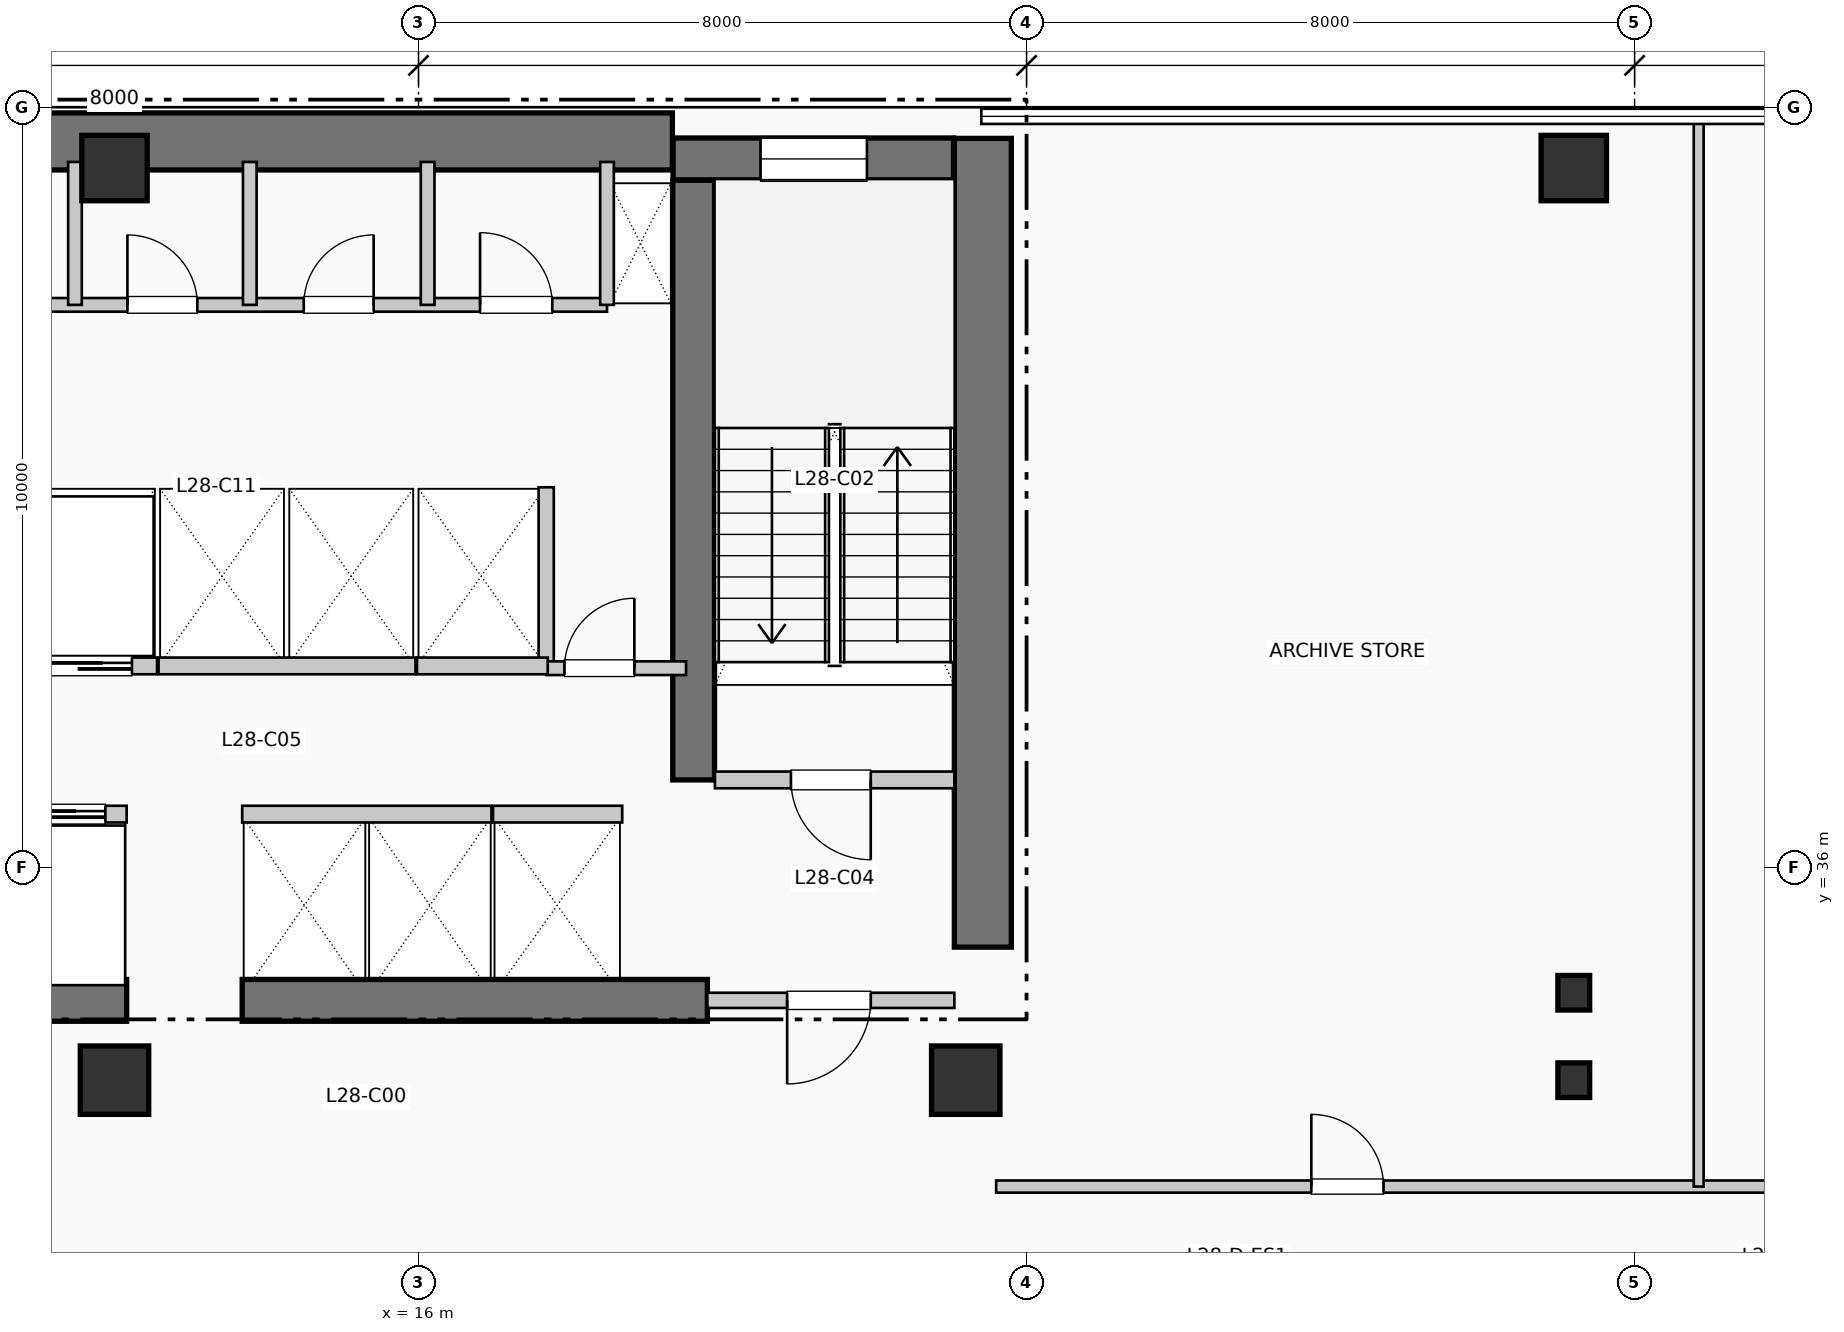
"""IFC4 building model, lengths in metres.
Left out: names, types, materials, properties, quantities, classifications, styles, units other than length and angle.
Written with IfcOpenShell. Run it as: python <this file> out.ifc"""

import sys

from ifc_helpers import new_model, si_unit, direction, frame, frame_2d, origin, origin_2d, place, context, subcontext, project, spatial, rectangle, i_section, extrude, element, fill, save


model = new_model("IFC4")
c1 = context("Model", 3, precision=1e-05, world=origin(), true_north=direction((0.0, 1.0)))
c2 = subcontext(c1, "Body", "Model", "MODEL_VIEW")
j1 = project(units=[si_unit("LENGTHUNIT", "METRE"), si_unit("PLANEANGLEUNIT", "RADIAN")], contexts=[c1])
p1 = place(None, origin())
s1 = spatial("IfcSite", under=j1, at=p1, CompositionType="ELEMENT")
p2 = place(p1, origin())
s2 = spatial("IfcBuilding", under=s1, at=p2, CompositionType="ELEMENT")
p3 = place(p2, frame((0.0, 0.0, 118.47)))
s3 = spatial("IfcBuildingStorey", under=s2, at=p3, CompositionType="ELEMENT", Elevation=118.47)
p4 = place(p3, frame((5.36, 45.55, 0.0), z_axis=(0.0, 0.0, 1.0), x_axis=(1.0, 0.0, 0.0)))
e1 = element("IfcWall", 1, at=p4, inside=s3, PredefinedType="SHEAR", context=c2, shape_type="SweptSolid", body=[
    extrude(rectangle(XDim=13.98, YDim=0.75, at=frame_2d((6.99, 0.0))), origin(), (0.0, 0.0, 1.0), 3.96),
])
p5 = place(p3, frame((23.425, 34.95, 0.0), z_axis=(0.0, 0.0, 1.0), x_axis=(0.0, 1.0, 0.0)))
e2 = element("IfcWall", 2, at=p5, inside=s3, PredefinedType="SHEAR", context=c2, shape_type="SweptSolid", body=[
    extrude(rectangle(XDim=10.64, YDim=0.75, at=frame_2d((5.32, 0.0))), origin(), (0.0, 0.0, 1.0), 3.96),
])
p6 = place(p3, frame((1.45, 34.25, 0.0), z_axis=(0.0, 0.0, 1.0), x_axis=(1.0, 0.0, 0.0)))
e3 = element("IfcWall", 3, at=p6, inside=s3, PredefinedType="SHEAR", context=c2, shape_type="SweptSolid", body=[
    extrude(rectangle(XDim=10.71, YDim=0.55, at=frame_2d((5.355, 0.0))), origin(), (0.0, 0.0, 1.0), 3.96),
])
p7 = place(p6, frame((7.25, 0.0, 0.0), z_axis=(0.0, 0.0, 1.0), x_axis=(-1.0, 0.0, 0.0)))
e4 = element("IfcOpeningElement", 4, at=p7, cuts=e3, PredefinedType="OPENING", context=c2, shape_type="SweptSolid", body=[
    extrude(rectangle(XDim=1.1, YDim=2.15, at=frame_2d((0.55, 1.075))), frame((0.0, 0.285, 0.0), z_axis=(0.0, -1.0, 0.0), x_axis=(1.0, 0.0, 0.0)), (0.0, 0.0, 1.0), 0.57),
])
p8 = place(p3, frame((13.68, 34.25, 0.0), z_axis=(0.0, 0.0, 1.0), x_axis=(1.0, 0.0, 0.0)))
e5 = element("IfcWall", 5, at=p8, inside=s3, PredefinedType="SHEAR", context=c2, shape_type="SweptSolid", body=[
    extrude(rectangle(XDim=6.12, YDim=0.55, at=frame_2d((3.06, 0.0))), origin(), (0.0, 0.0, 1.0), 3.96),
])
p9 = place(p3, frame((19.62, 37.15, 0.0), z_axis=(0.0, 0.0, 1.0), x_axis=(0.0, 1.0, 0.0)))
e6 = element("IfcWall", 6, at=p9, inside=s3, PredefinedType="SHEAR", context=c2, shape_type="SweptSolid", body=[
    extrude(rectangle(XDim=7.89, YDim=0.55, at=frame_2d((3.945, 0.0))), origin(), (0.0, 0.0, 1.0), 3.96),
])
p10 = place(p3, frame((19.35, 45.32, 0.0), z_axis=(0.0, 0.0, 1.0), x_axis=(1.0, 0.0, 0.0)))
e7 = element("IfcWall", 7, at=p10, inside=s3, PredefinedType="SHEAR", context=c2, shape_type="SweptSolid", body=[
    extrude(rectangle(XDim=3.69, YDim=0.55, at=frame_2d((1.845, 0.0))), origin(), (0.0, 0.0, 1.0), 3.96),
])
p11 = place(p10, frame((1.15, 0.0, 1.05)))
e8 = element("IfcOpeningElement", 8, at=p11, cuts=e7, PredefinedType="OPENING", context=c2, shape_type="SweptSolid", body=[
    extrude(rectangle(XDim=1.4, YDim=1.8, at=frame_2d((0.7, 0.9))), frame((0.0, 0.285, 0.0), z_axis=(0.0, -1.0, 0.0), x_axis=(1.0, 0.0, 0.0)), (0.0, 0.0, 1.0), 0.57),
])
p12 = place(p3, frame((12.0, 33.2, 0.0), z_axis=(0.0, 0.0, 1.0), x_axis=(1.0, 0.0, 0.0)))
e9 = element("IfcColumn", 9, at=p12, inside=s3, PredefinedType="COLUMN", context=c2, shape_type="SweptSolid", body=[
    extrude(rectangle(XDim=0.9, YDim=0.9, at=origin_2d()), origin(), (0.0, 0.0, 1.0), 3.96),
])
p13 = place(p3, frame((12.0, 45.2, 0.0), z_axis=(0.0, 0.0, 1.0), x_axis=(1.0, 0.0, 0.0)))
e10 = element("IfcColumn", 10, at=p13, inside=s3, PredefinedType="COLUMN", context=c2, shape_type="SweptSolid", body=[
    extrude(rectangle(XDim=0.86, YDim=0.86, at=origin_2d()), origin(), (0.0, 0.0, 1.0), 3.96),
])
p14 = place(p3, frame((23.2, 33.2, 0.0), z_axis=(0.0, 0.0, 1.0), x_axis=(1.0, 0.0, 0.0)))
e11 = element("IfcColumn", 11, at=p14, inside=s3, PredefinedType="COLUMN", context=c2, shape_type="SweptSolid", body=[
    extrude(rectangle(XDim=0.9, YDim=0.9, at=origin_2d()), origin(), (0.0, 0.0, 1.0), 3.96),
])
for number, where, z_axis, x_axis in (
    (12, (31.2, 33.2, 0.0), (0.0, 0.0, 1.0), (1.0, 0.0, 0.0)),
    (13, (31.2, 34.35, 0.0), (0.0, 0.0, 1.0), (1.0, 0.0, 0.0)),
):
    element("IfcColumn", number, at=place(p3, frame(where, z_axis=z_axis, x_axis=x_axis)), inside=s3, PredefinedType="COLUMN", context=c2, shape_type="SweptSolid", body=[
        extrude(i_section(OverallWidth=0.418, OverallDepth=0.455, WebThickness=0.032, FlangeThickness=0.051, at=origin_2d()), origin(), (0.0, 0.0, 1.0), 3.96),
    ])
p15 = place(p3, frame((31.2, 45.2, 0.0), z_axis=(0.0, 0.0, 1.0), x_axis=(1.0, 0.0, 0.0)))
e14 = element("IfcColumn", 14, at=p15, inside=s3, PredefinedType="COLUMN", context=c2, shape_type="SweptSolid", body=[
    extrude(rectangle(XDim=0.86, YDim=0.86, at=origin_2d()), origin(), (0.0, 0.0, 1.0), 3.96),
])
p16 = place(p3, frame((19.9, 37.15, 0.0), z_axis=(0.0, 0.0, 1.0), x_axis=(1.0, 0.0, 0.0)))
e15 = element("IfcWall", 15, at=p16, inside=s3, PredefinedType="PARTITIONING", context=c2, shape_type="SweptSolid", body=[
    extrude(rectangle(XDim=3.15, YDim=0.22, at=frame_2d((1.575, 0.0))), origin(), (0.0, 0.0, 1.0), 3.71),
])
p17 = place(p16, frame((2.05, 0.0, 0.0), z_axis=(0.0, 0.0, 1.0), x_axis=(-1.0, 0.0, 0.0)))
e16 = element("IfcOpeningElement", 16, at=p17, cuts=e15, PredefinedType="OPENING", context=c2, shape_type="SweptSolid", body=[
    extrude(rectangle(XDim=1.05, YDim=2.15, at=frame_2d((0.525, 1.075))), frame((0.0, 0.12, 0.0), z_axis=(0.0, -1.0, 0.0), x_axis=(1.0, 0.0, 0.0)), (0.0, 0.0, 1.0), 0.24),
])
p18 = place(p3, frame((19.8, 34.25, 0.0), z_axis=(0.0, 0.0, 1.0), x_axis=(1.0, 0.0, 0.0)))
e17 = element("IfcWall", 17, at=p18, inside=s3, PredefinedType="PARTITIONING", context=c2, shape_type="SweptSolid", body=[
    extrude(rectangle(XDim=3.25, YDim=0.2, at=frame_2d((1.625, 0.0))), origin(), (0.0, 0.0, 1.0), 3.71),
])
p19 = place(p18, frame((2.15, 0.0, 0.0), z_axis=(0.0, 0.0, 1.0), x_axis=(-1.0, 0.0, 0.0)))
e18 = element("IfcOpeningElement", 18, at=p19, cuts=e17, PredefinedType="OPENING", context=c2, shape_type="SweptSolid", body=[
    extrude(rectangle(XDim=1.1, YDim=2.15, at=frame_2d((0.55, 1.075))), frame((0.0, 0.11, 0.0), z_axis=(0.0, -1.0, 0.0), x_axis=(1.0, 0.0, 0.0)), (0.0, 0.0, 1.0), 0.22),
])
p20 = place(p3, frame((17.68, 38.65, 0.0), z_axis=(0.0, 0.0, 1.0), x_axis=(0.0, 1.0, 0.0)))
e19 = element("IfcWall", 19, at=p20, inside=s3, PredefinedType="PARTITIONING", context=c2, shape_type="SweptSolid", body=[
    extrude(rectangle(XDim=2.35, YDim=0.2, at=frame_2d((1.175, 0.0))), origin(), (0.0, 0.0, 1.0), 3.71),
])
p21 = place(p3, frame((17.68, 38.62, 0.0), z_axis=(0.0, 0.0, 1.0), x_axis=(1.0, 0.0, 0.0)))
e20 = element("IfcWall", 20, at=p21, inside=s3, PredefinedType="PARTITIONING", context=c2, shape_type="SweptSolid", body=[
    extrude(rectangle(XDim=1.84, YDim=0.18, at=frame_2d((0.92, 0.0))), origin(), (0.0, 0.0, 1.0), 3.71),
])
p22 = place(p21, frame((0.24, 0.0, 0.0)))
e21 = element("IfcOpeningElement", 21, at=p22, cuts=e20, PredefinedType="OPENING", context=c2, shape_type="SweptSolid", body=[
    extrude(rectangle(XDim=0.92, YDim=2.1, at=frame_2d((0.46, 1.05))), frame((0.0, 0.1, 0.0), z_axis=(0.0, -1.0, 0.0), x_axis=(1.0, 0.0, 0.0)), (0.0, 0.0, 1.0), 0.2),
])
p23 = place(p3, frame((8.9, 36.7, 0.0), z_axis=(0.0, 0.0, 1.0), x_axis=(1.0, 0.0, 0.0)))
e22 = element("IfcWall", 22, at=p23, inside=s3, PredefinedType="PARTITIONING", context=c2, shape_type="SweptSolid", body=[
    extrude(rectangle(XDim=3.26, YDim=0.22, at=frame_2d((1.63, 0.0))), origin(), (0.0, 0.0, 1.0), 3.71),
])
p24 = place(p23, frame((0.26, 0.0, 0.0)))
e23 = element("IfcOpeningElement", 23, at=p24, cuts=e22, PredefinedType="OPENING", context=c2, shape_type="SweptSolid", body=[
    extrude(rectangle(XDim=1.1, YDim=2.2, at=frame_2d((0.55, 1.1))), frame((0.0, 0.12, 0.0), z_axis=(0.0, -1.0, 0.0), x_axis=(1.0, 0.0, 0.0)), (0.0, 0.0, 1.0), 0.24),
])
p25 = place(p23, frame((1.88, 0.0, 0.0)))
e24 = element("IfcOpeningElement", 24, at=p25, cuts=e22, PredefinedType="OPENING", context=c2, shape_type="SweptSolid", body=[
    extrude(rectangle(XDim=1.1, YDim=2.2, at=frame_2d((0.55, 1.1))), frame((0.0, 0.12, 0.0), z_axis=(0.0, -1.0, 0.0), x_axis=(1.0, 0.0, 0.0)), (0.0, 0.0, 1.0), 0.24),
])
p26 = place(p3, frame((9.18, 38.65, 0.0), z_axis=(0.0, 0.0, 1.0), x_axis=(1.0, 0.0, 0.0)))
e25 = element("IfcWall", 25, at=p26, inside=s3, PredefinedType="PARTITIONING", context=c2, shape_type="SweptSolid", body=[
    extrude(rectangle(XDim=3.38, YDim=0.22, at=frame_2d((1.69, 0.0))), origin(), (0.0, 0.0, 1.0), 3.71),
])
p27 = place(p26, frame((0.3, 0.0, 0.0)))
e26 = element("IfcOpeningElement", 26, at=p27, cuts=e25, PredefinedType="OPENING", context=c2, shape_type="SweptSolid", body=[
    extrude(rectangle(XDim=1.1, YDim=2.2, at=frame_2d((0.55, 1.1))), frame((0.0, 0.12, 0.0), z_axis=(0.0, -1.0, 0.0), x_axis=(1.0, 0.0, 0.0)), (0.0, 0.0, 1.0), 0.24),
])
p28 = place(p26, frame((1.95, 0.0, 0.0)))
e27 = element("IfcOpeningElement", 27, at=p28, cuts=e25, PredefinedType="OPENING", context=c2, shape_type="SweptSolid", body=[
    extrude(rectangle(XDim=1.1, YDim=2.2, at=frame_2d((0.55, 1.1))), frame((0.0, 0.12, 0.0), z_axis=(0.0, -1.0, 0.0), x_axis=(1.0, 0.0, 0.0)), (0.0, 0.0, 1.0), 0.24),
])
p29 = place(p3, frame((13.68, 36.7, 0.0), z_axis=(0.0, 0.0, 1.0), x_axis=(1.0, 0.0, 0.0)))
e28 = element("IfcWall", 28, at=p29, inside=s3, PredefinedType="PARTITIONING", context=c2, shape_type="SweptSolid", body=[
    extrude(rectangle(XDim=3.28, YDim=0.22, at=frame_2d((1.64, 0.0))), origin(), (0.0, 0.0, 1.0), 3.71),
])
p30 = place(p3, frame((12.58, 38.65, 0.0), z_axis=(0.0, 0.0, 1.0), x_axis=(1.0, 0.0, 0.0)))
e29 = element("IfcWall", 29, at=p30, inside=s3, PredefinedType="PARTITIONING", context=c2, shape_type="SweptSolid", body=[
    extrude(rectangle(XDim=3.38, YDim=0.22, at=frame_2d((1.69, 0.0))), origin(), (0.0, 0.0, 1.0), 3.71),
])
p31 = place(p3, frame((16.98, 36.7, 0.0), z_axis=(0.0, 0.0, 1.0), x_axis=(1.0, 0.0, 0.0)))
e30 = element("IfcWall", 30, at=p31, inside=s3, PredefinedType="PARTITIONING", context=c2, shape_type="SweptSolid", body=[
    extrude(rectangle(XDim=1.7, YDim=0.22, at=frame_2d((0.85, 0.0))), origin(), (0.0, 0.0, 1.0), 3.71),
])
p32 = place(p3, frame((15.98, 38.65, 0.0), z_axis=(0.0, 0.0, 1.0), x_axis=(1.0, 0.0, 0.0)))
e31 = element("IfcWall", 31, at=p32, inside=s3, PredefinedType="PARTITIONING", context=c2, shape_type="SweptSolid", body=[
    extrude(rectangle(XDim=1.72, YDim=0.22, at=frame_2d((0.86, 0.0))), origin(), (0.0, 0.0, 1.0), 3.71),
])
p33 = place(p3, frame((9.15, 43.4, 0.0), z_axis=(0.0, 0.0, 1.0), x_axis=(1.0, 0.0, 0.0)))
e32 = element("IfcWall", 32, at=p33, inside=s3, PredefinedType="PLUMBINGWALL", context=c2, shape_type="SweptSolid", body=[
    extrude(rectangle(XDim=9.33, YDim=0.18, at=frame_2d((4.665, 0.0))), origin(), (0.0, 0.0, 1.0), 3.71),
])
p34 = place(p33, frame((0.72, 0.0, 0.0)))
e33 = element("IfcOpeningElement", 33, at=p34, cuts=e32, PredefinedType="OPENING", context=c2, shape_type="SweptSolid", body=[
    extrude(rectangle(XDim=0.92, YDim=2.1, at=frame_2d((0.46, 1.05))), frame((0.0, 0.1, 0.0), z_axis=(0.0, -1.0, 0.0), x_axis=(1.0, 0.0, 0.0)), (0.0, 0.0, 1.0), 0.2),
])
p35 = place(p33, frame((3.02, 0.0, 0.0)))
e34 = element("IfcOpeningElement", 34, at=p35, cuts=e32, PredefinedType="OPENING", context=c2, shape_type="SweptSolid", body=[
    extrude(rectangle(XDim=0.92, YDim=2.1, at=frame_2d((0.46, 1.05))), frame((0.0, 0.1, 0.0), z_axis=(0.0, -1.0, 0.0), x_axis=(1.0, 0.0, 0.0)), (0.0, 0.0, 1.0), 0.2),
])
p36 = place(p33, frame((5.34, 0.0, 0.0)))
e35 = element("IfcOpeningElement", 35, at=p36, cuts=e32, PredefinedType="OPENING", context=c2, shape_type="SweptSolid", body=[
    extrude(rectangle(XDim=0.92, YDim=2.1, at=frame_2d((0.46, 1.05))), frame((0.0, 0.1, 0.0), z_axis=(0.0, -1.0, 0.0), x_axis=(1.0, 0.0, 0.0)), (0.0, 0.0, 1.0), 0.2),
])
p37 = place(p33, frame((7.66, 0.0, 0.0)))
e36 = element("IfcOpeningElement", 36, at=p37, cuts=e32, PredefinedType="OPENING", context=c2, shape_type="SweptSolid", body=[
    extrude(rectangle(XDim=0.95, YDim=2.1, at=frame_2d((0.475, 1.05))), frame((0.0, 0.1, 0.0), z_axis=(0.0, -1.0, 0.0), x_axis=(1.0, 0.0, 0.0)), (0.0, 0.0, 1.0), 0.2),
])
for number, where, z_axis, x_axis in (
    (37, (18.48, 43.4, 0.0), (0.0, 0.0, 1.0), (0.0, 1.0, 0.0)),
    (38, (11.48, 43.4, 0.0), (0.0, 0.0, 1.0), (0.0, 1.0, 0.0)),
    (39, (13.78, 43.4, 0.0), (0.0, 0.0, 1.0), (0.0, 1.0, 0.0)),
    (40, (16.12, 43.4, 0.0), (0.0, 0.0, 1.0), (0.0, 1.0, 0.0)),
):
    element("IfcWall", number, at=place(p3, frame(where, z_axis=z_axis, x_axis=x_axis)), inside=s3, PredefinedType="PLUMBINGWALL", context=c2, shape_type="SweptSolid", body=[
        extrude(rectangle(XDim=1.88, YDim=0.18, at=frame_2d((0.94, 0.0))), origin(), (0.0, 0.0, 1.0), 3.71),
    ])
p38 = place(p3, frame((23.6, 31.8, 0.0), z_axis=(0.0, 0.0, 1.0), x_axis=(1.0, 0.0, 0.0)))
e41 = element("IfcWall", 41, at=p38, inside=s3, PredefinedType="PARTITIONING", context=c2, shape_type="SweptSolid", body=[
    extrude(rectangle(XDim=26.41, YDim=0.16, at=frame_2d((13.205, 0.0))), origin(), (0.0, 0.0, 1.0), 3.71),
])
p39 = place(p38, frame((4.147, 0.0, 0.0)))
e42 = element("IfcOpeningElement", 42, at=p39, cuts=e41, PredefinedType="OPENING", context=c2, shape_type="SweptSolid", body=[
    extrude(rectangle(XDim=0.95, YDim=2.15, at=frame_2d((0.475, 1.075))), frame((0.0, 0.09, 0.0), z_axis=(0.0, -1.0, 0.0), x_axis=(1.0, 0.0, 0.0)), (0.0, 0.0, 1.0), 0.18),
])
p40 = place(p38, frame((13.39, 0.0, 0.0)))
e43 = element("IfcOpeningElement", 43, at=p40, cuts=e41, PredefinedType="OPENING", context=c2, shape_type="SweptSolid", body=[
    extrude(rectangle(XDim=0.95, YDim=2.15, at=frame_2d((0.475, 1.075))), frame((0.0, 0.09, 0.0), z_axis=(0.0, -1.0, 0.0), x_axis=(1.0, 0.0, 0.0)), (0.0, 0.0, 1.0), 0.18),
])
p41 = place(p38, frame((21.973, 0.0, 0.0)))
e44 = element("IfcOpeningElement", 44, at=p41, cuts=e41, PredefinedType="OPENING", context=c2, shape_type="SweptSolid", body=[
    extrude(rectangle(XDim=0.95, YDim=2.15, at=frame_2d((0.475, 1.075))), frame((0.0, 0.09, 0.0), z_axis=(0.0, -1.0, 0.0), x_axis=(1.0, 0.0, 0.0)), (0.0, 0.0, 1.0), 0.18),
])
p42 = place(p3, frame((32.844, 31.8, 0.0), z_axis=(0.0, 0.0, 1.0), x_axis=(0.0, 1.0, 0.0)))
e45 = element("IfcWall", 45, at=p42, inside=s3, PredefinedType="PARTITIONING", context=c2, shape_type="SweptSolid", body=[
    extrude(rectangle(XDim=14.01, YDim=0.13, at=frame_2d((7.005, 0.0))), origin(), (0.0, 0.0, 1.0), 3.71),
])
p43 = place(p11, origin())
e46 = element("IfcWindow", 46, at=p43, inside=s3, PartitioningType="SINGLE_PANEL", PredefinedType="WINDOW", context=c2, shape_type="SweptSolid", body=[
    extrude(rectangle(XDim=1.4, YDim=1.8, at=frame_2d((0.7, 0.9))), frame((0.0, 0.03, 0.0), z_axis=(0.0, -1.0, 0.0), x_axis=(1.0, 0.0, 0.0)), (0.0, 0.0, 1.0), 0.06),
])
fill(e8, e46)
p44 = place(p17, origin())
e47 = element("IfcDoor", 47, at=p44, inside=s3, OperationType="SINGLE_SWING_RIGHT", PredefinedType="DOOR", context=c2, shape_type="SweptSolid", body=[
    extrude(rectangle(XDim=1.05, YDim=2.15, at=frame_2d((0.525, 1.075))), frame((0.0, 0.025, 0.0), z_axis=(0.0, -1.0, 0.0), x_axis=(1.0, 0.0, 0.0)), (0.0, 0.0, 1.0), 0.05),
])
fill(e16, e47)
p45 = place(p19, origin())
e48 = element("IfcDoor", 48, at=p45, inside=s3, OperationType="SINGLE_SWING_LEFT", PredefinedType="DOOR", context=c2, shape_type="SweptSolid", body=[
    extrude(rectangle(XDim=1.1, YDim=2.15, at=frame_2d((0.55, 1.075))), frame((0.0, 0.025, 0.0), z_axis=(0.0, -1.0, 0.0), x_axis=(1.0, 0.0, 0.0)), (0.0, 0.0, 1.0), 0.05),
])
fill(e18, e48)
p46 = place(p22, origin())
e49 = element("IfcDoor", 49, at=p46, inside=s3, OperationType="SINGLE_SWING_RIGHT", PredefinedType="DOOR", context=c2, shape_type="SweptSolid", body=[
    extrude(rectangle(XDim=0.92, YDim=2.1, at=frame_2d((0.46, 1.05))), frame((0.0, 0.025, 0.0), z_axis=(0.0, -1.0, 0.0), x_axis=(1.0, 0.0, 0.0)), (0.0, 0.0, 1.0), 0.05),
])
fill(e21, e49)
p47 = place(p25, origin())
e50 = element("IfcDoor", 50, at=p47, inside=s3, OperationType="SLIDING_TO_LEFT", PredefinedType="DOOR", context=c2, shape_type="SweptSolid", body=[
    extrude(rectangle(XDim=1.1, YDim=2.2, at=frame_2d((0.55, 1.1))), frame((0.0, 0.025, 0.0), z_axis=(0.0, -1.0, 0.0), x_axis=(1.0, 0.0, 0.0)), (0.0, 0.0, 1.0), 0.05),
])
fill(e24, e50)
p48 = place(p28, origin())
e51 = element("IfcDoor", 51, at=p48, inside=s3, OperationType="SLIDING_TO_LEFT", PredefinedType="DOOR", context=c2, shape_type="SweptSolid", body=[
    extrude(rectangle(XDim=1.1, YDim=2.2, at=frame_2d((0.55, 1.1))), frame((0.0, 0.025, 0.0), z_axis=(0.0, -1.0, 0.0), x_axis=(1.0, 0.0, 0.0)), (0.0, 0.0, 1.0), 0.05),
])
fill(e27, e51)
p49 = place(p35, origin())
e52 = element("IfcDoor", 52, at=p49, inside=s3, OperationType="SINGLE_SWING_LEFT", PredefinedType="DOOR", context=c2, shape_type="SweptSolid", body=[
    extrude(rectangle(XDim=0.92, YDim=2.1, at=frame_2d((0.46, 1.05))), frame((0.0, 0.025, 0.0), z_axis=(0.0, -1.0, 0.0), x_axis=(1.0, 0.0, 0.0)), (0.0, 0.0, 1.0), 0.05),
])
fill(e34, e52)
p50 = place(p36, origin())
e53 = element("IfcDoor", 53, at=p50, inside=s3, OperationType="SINGLE_SWING_RIGHT", PredefinedType="DOOR", context=c2, shape_type="SweptSolid", body=[
    extrude(rectangle(XDim=0.92, YDim=2.1, at=frame_2d((0.46, 1.05))), frame((0.0, 0.025, 0.0), z_axis=(0.0, -1.0, 0.0), x_axis=(1.0, 0.0, 0.0)), (0.0, 0.0, 1.0), 0.05),
])
fill(e35, e53)
p51 = place(p37, origin())
e54 = element("IfcDoor", 54, at=p51, inside=s3, OperationType="SINGLE_SWING_LEFT", PredefinedType="DOOR", context=c2, shape_type="SweptSolid", body=[
    extrude(rectangle(XDim=0.95, YDim=2.1, at=frame_2d((0.475, 1.05))), frame((0.0, 0.025, 0.0), z_axis=(0.0, -1.0, 0.0), x_axis=(1.0, 0.0, 0.0)), (0.0, 0.0, 1.0), 0.05),
])
fill(e36, e54)
p52 = place(p39, origin())
e55 = element("IfcDoor", 55, at=p52, inside=s3, OperationType="SINGLE_SWING_LEFT", PredefinedType="DOOR", context=c2, shape_type="SweptSolid", body=[
    extrude(rectangle(XDim=0.95, YDim=2.15, at=frame_2d((0.475, 1.075))), frame((0.0, 0.025, 0.0), z_axis=(0.0, -1.0, 0.0), x_axis=(1.0, 0.0, 0.0)), (0.0, 0.0, 1.0), 0.05),
])
fill(e42, e55)
save(model, sys.argv[1])
